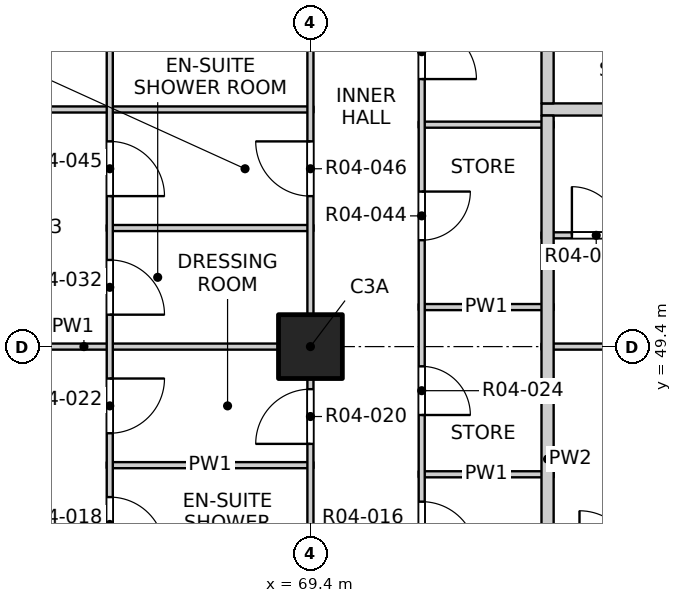
"""IFC4 building model, lengths in metres.
Left out: names, types, materials, properties, quantities, classifications, styles, units other than length and angle.
Written with IfcOpenShell. Run it as: python <this file> out.ifc"""

import sys

from ifc_helpers import new_model, si_unit, direction, frame, frame_2d, origin, origin_2d, place, context, subcontext, project, spatial, rectangle, extrude, element, fill, save


model = new_model("IFC4")
c1 = context("Model", 3, precision=1e-05, world=origin(), true_north=direction((0.0, 1.0)))
c2 = subcontext(c1, "Body", "Model", "MODEL_VIEW")
j1 = project(units=[si_unit("LENGTHUNIT", "METRE"), si_unit("PLANEANGLEUNIT", "RADIAN")], contexts=[c1])
p1 = place(None, origin())
s1 = spatial("IfcSite", under=j1, at=p1, CompositionType="ELEMENT")
p2 = place(p1, origin())
s2 = spatial("IfcBuilding", under=s1, at=p2, CompositionType="ELEMENT")
p3 = place(p2, frame((0.0, 0.0, 58.0)))
s3 = spatial("IfcBuildingStorey", under=s2, at=p3, CompositionType="ELEMENT", Elevation=58.0)
p4 = place(p3, frame((69.4, 49.4, -0.25), z_axis=(0.0, 0.0, 1.0), x_axis=(1.0, 0.0, 0.0)))
e1 = element("IfcColumn", 1, at=p4, inside=s3, PredefinedType="COLUMN", context=c2, shape_type="SweptSolid", body=[
    extrude(rectangle(XDim=1.05, YDim=1.05, at=origin_2d()), origin(), (0.0, 0.0, 1.0), 3.4),
])
p5 = place(p3, frame((71.18, 47.3, 0.0), z_axis=(0.0, 0.0, 1.0), x_axis=(1.0, 0.0, 0.0)))
e2 = element("IfcWall", 2, at=p5, inside=s3, PredefinedType="PARTITIONING", context=c2, shape_type="SweptSolid", body=[
    extrude(rectangle(XDim=2.22, YDim=0.1, at=frame_2d((1.11, 0.0))), origin(), (0.0, 0.0, 1.0), 3.15),
])
p6 = place(p3, frame((66.05, 47.45, 0.0), z_axis=(0.0, 0.0, 1.0), x_axis=(1.0, 0.0, 0.0)))
e3 = element("IfcWall", 3, at=p6, inside=s3, PredefinedType="PARTITIONING", context=c2, shape_type="SweptSolid", body=[
    extrude(rectangle(XDim=3.4, YDim=0.1, at=frame_2d((1.7, 0.0))), origin(), (0.0, 0.0, 1.0), 3.15),
])
p7 = place(p3, frame((61.9, 49.4, 0.0), z_axis=(0.0, 0.0, 1.0), x_axis=(1.0, 0.0, 0.0)))
e4 = element("IfcWall", 4, at=p7, inside=s3, PredefinedType="PARTITIONING", context=c2, shape_type="SweptSolid", body=[
    extrude(rectangle(XDim=7.55, YDim=0.1, at=frame_2d((3.775, 0.0))), origin(), (0.0, 0.0, 1.0), 2.55),
])
p8 = place(p3, frame((73.2, 49.4, 0.0), z_axis=(0.0, 0.0, 1.0), x_axis=(1.0, 0.0, 0.0)))
e5 = element("IfcWall", 5, at=p8, inside=s3, PredefinedType="PARTITIONING", context=c2, shape_type="SweptSolid", body=[
    extrude(rectangle(XDim=23.6, YDim=0.1, at=frame_2d((11.8, 0.0))), origin(), (0.0, 0.0, 1.0), 3.15),
])
p9 = place(p8, frame((2.425, 0.0, 0.0)))
e6 = element("IfcOpeningElement", 6, at=p9, cuts=e5, PredefinedType="OPENING", context=c2, shape_type="SweptSolid", body=[
    extrude(rectangle(XDim=0.9, YDim=2.1, at=frame_2d((0.45, 1.05))), frame((0.0, 0.06, 0.0), z_axis=(0.0, -1.0, 0.0), x_axis=(1.0, 0.0, 0.0)), (0.0, 0.0, 1.0), 0.12),
])
p10 = place(p8, frame((5.5, 0.0, 0.0)))
e7 = element("IfcOpeningElement", 7, at=p10, cuts=e5, PredefinedType="OPENING", context=c2, shape_type="SweptSolid", body=[
    extrude(rectangle(XDim=0.9, YDim=2.1, at=frame_2d((0.45, 1.05))), frame((0.0, 0.06, 0.0), z_axis=(0.0, -1.0, 0.0), x_axis=(1.0, 0.0, 0.0)), (0.0, 0.0, 1.0), 0.12),
])
p11 = place(p8, frame((10.2, 0.0, 0.0)))
e8 = element("IfcOpeningElement", 8, at=p11, cuts=e5, PredefinedType="OPENING", context=c2, shape_type="SweptSolid", body=[
    extrude(rectangle(XDim=0.9, YDim=2.1, at=frame_2d((0.45, 1.05))), frame((0.0, 0.06, 0.0), z_axis=(0.0, -1.0, 0.0), x_axis=(1.0, 0.0, 0.0)), (0.0, 0.0, 1.0), 0.12),
])
p12 = place(p8, frame((14.275, 0.0, 0.0)))
e9 = element("IfcOpeningElement", 9, at=p12, cuts=e5, PredefinedType="OPENING", context=c2, shape_type="SweptSolid", body=[
    extrude(rectangle(XDim=0.9, YDim=2.1, at=frame_2d((0.45, 1.05))), frame((0.0, 0.06, 0.0), z_axis=(0.0, -1.0, 0.0), x_axis=(1.0, 0.0, 0.0)), (0.0, 0.0, 1.0), 0.12),
])
p13 = place(p8, frame((17.2, 0.0, 0.0)))
e10 = element("IfcOpeningElement", 10, at=p13, cuts=e5, PredefinedType="OPENING", context=c2, shape_type="SweptSolid", body=[
    extrude(rectangle(XDim=0.9, YDim=2.1, at=frame_2d((0.45, 1.05))), frame((0.0, 0.06, 0.0), z_axis=(0.0, -1.0, 0.0), x_axis=(1.0, 0.0, 0.0)), (0.0, 0.0, 1.0), 0.12),
])
p14 = place(p8, frame((21.1, 0.0, 0.0)))
e11 = element("IfcOpeningElement", 11, at=p14, cuts=e5, PredefinedType="OPENING", context=c2, shape_type="SweptSolid", body=[
    extrude(rectangle(XDim=0.9, YDim=2.1, at=frame_2d((0.45, 1.05))), frame((0.0, 0.06, 0.0), z_axis=(0.0, -1.0, 0.0), x_axis=(1.0, 0.0, 0.0)), (0.0, 0.0, 1.0), 0.12),
])
p15 = place(p3, frame((71.18, 50.05, 0.0), z_axis=(0.0, 0.0, 1.0), x_axis=(1.0, 0.0, 0.0)))
e12 = element("IfcWall", 12, at=p15, inside=s3, PredefinedType="PARTITIONING", context=c2, shape_type="SweptSolid", body=[
    extrude(rectangle(XDim=2.22, YDim=0.1, at=frame_2d((1.11, 0.0))), origin(), (0.0, 0.0, 1.0), 3.15),
])
p16 = place(p3, frame((73.2, 51.23, 0.0), z_axis=(0.0, 0.0, 1.0), x_axis=(1.0, 0.0, 0.0)))
e13 = element("IfcWall", 13, at=p16, inside=s3, PredefinedType="PARTITIONING", context=c2, shape_type="SweptSolid", body=[
    extrude(rectangle(XDim=1.75, YDim=0.1, at=frame_2d((0.875, 0.0))), origin(), (0.0, 0.0, 1.0), 3.15),
])
p17 = place(p16, frame((0.5, 0.0, 0.0)))
e14 = element("IfcOpeningElement", 14, at=p17, cuts=e13, PredefinedType="OPENING", context=c2, shape_type="SweptSolid", body=[
    extrude(rectangle(XDim=0.8, YDim=2.1, at=frame_2d((0.4, 1.05))), frame((0.0, 0.06, 0.0), z_axis=(0.0, -1.0, 0.0), x_axis=(1.0, 0.0, 0.0)), (0.0, 0.0, 1.0), 0.12),
])
p18 = place(p3, frame((66.05, 51.35, 0.0), z_axis=(0.0, 0.0, 1.0), x_axis=(1.0, 0.0, 0.0)))
e15 = element("IfcWall", 15, at=p18, inside=s3, PredefinedType="PARTITIONING", context=c2, shape_type="SweptSolid", body=[
    extrude(rectangle(XDim=3.4, YDim=0.1, at=frame_2d((1.7, 0.0))), origin(), (0.0, 0.0, 1.0), 3.15),
])
p19 = place(p3, frame((71.18, 53.05, 0.0), z_axis=(0.0, 0.0, 1.0), x_axis=(1.0, 0.0, 0.0)))
e16 = element("IfcWall", 16, at=p19, inside=s3, PredefinedType="PARTITIONING", context=c2, shape_type="SweptSolid", body=[
    extrude(rectangle(XDim=2.22, YDim=0.1, at=frame_2d((1.11, 0.0))), origin(), (0.0, 0.0, 1.0), 3.15),
])
p20 = place(p3, frame((61.9, 53.3, 0.0), z_axis=(0.0, 0.0, 1.0), x_axis=(1.0, 0.0, 0.0)))
e17 = element("IfcWall", 17, at=p20, inside=s3, PredefinedType="PARTITIONING", context=c2, shape_type="SweptSolid", body=[
    extrude(rectangle(XDim=7.55, YDim=0.1, at=frame_2d((3.775, 0.0))), origin(), (0.0, 0.0, 1.0), 3.15),
])
p21 = place(p3, frame((73.2, 53.3, 0.0), z_axis=(0.0, 0.0, 1.0), x_axis=(1.0, 0.0, 0.0)))
e18 = element("IfcWall", 18, at=p21, inside=s3, PredefinedType="PARTITIONING", context=c2, shape_type="SweptSolid", body=[
    extrude(rectangle(XDim=23.6, YDim=0.2, at=frame_2d((11.8, 0.0))), origin(), (0.0, 0.0, 1.0), 3.15),
])
p22 = place(p21, frame((2.975, 0.0, 0.0)))
e19 = element("IfcOpeningElement", 19, at=p22, cuts=e18, PredefinedType="OPENING", context=c2, shape_type="SweptSolid", body=[
    extrude(rectangle(XDim=1.0, YDim=2.1, at=frame_2d((0.5, 1.05))), frame((0.0, 0.11, 0.0), z_axis=(0.0, -1.0, 0.0), x_axis=(1.0, 0.0, 0.0)), (0.0, 0.0, 1.0), 0.22),
])
p23 = place(p21, frame((17.875, 0.0, 0.0)))
e20 = element("IfcOpeningElement", 20, at=p23, cuts=e18, PredefinedType="OPENING", context=c2, shape_type="SweptSolid", body=[
    extrude(rectangle(XDim=1.0, YDim=2.1, at=frame_2d((0.5, 1.05))), frame((0.0, 0.11, 0.0), z_axis=(0.0, -1.0, 0.0), x_axis=(1.0, 0.0, 0.0)), (0.0, 0.0, 1.0), 0.22),
])
p24 = place(p3, frame((66.1, 41.9, 0.0), z_axis=(0.0, 0.0, 1.0), x_axis=(0.0, 1.0, 0.0)))
e21 = element("IfcWall", 21, at=p24, inside=s3, PredefinedType="PARTITIONING", context=c2, shape_type="SweptSolid", body=[
    extrude(rectangle(XDim=19.1, YDim=0.1, at=frame_2d((9.55, 0.0))), origin(), (0.0, 0.0, 1.0), 3.15),
])
p25 = place(p24, frame((1.05, 0.0, 0.0)))
e22 = element("IfcOpeningElement", 22, at=p25, cuts=e21, PredefinedType="OPENING", context=c2, shape_type="SweptSolid", body=[
    extrude(rectangle(XDim=1.2, YDim=2.1, at=frame_2d((0.6, 1.05))), frame((0.0, 0.06, 0.0), z_axis=(0.0, -1.0, 0.0), x_axis=(1.0, 0.0, 0.0)), (0.0, 0.0, 1.0), 0.12),
])
p26 = place(p24, frame((4.125, 0.0, 0.0)))
e23 = element("IfcOpeningElement", 23, at=p26, cuts=e21, PredefinedType="OPENING", context=c2, shape_type="SweptSolid", body=[
    extrude(rectangle(XDim=0.9, YDim=2.1, at=frame_2d((0.45, 1.05))), frame((0.0, 0.06, 0.0), z_axis=(0.0, -1.0, 0.0), x_axis=(1.0, 0.0, 0.0)), (0.0, 0.0, 1.0), 0.12),
])
p27 = place(p24, frame((6.075, 0.0, 0.0)))
e24 = element("IfcOpeningElement", 24, at=p27, cuts=e21, PredefinedType="OPENING", context=c2, shape_type="SweptSolid", body=[
    extrude(rectangle(XDim=0.9, YDim=2.1, at=frame_2d((0.45, 1.05))), frame((0.0, 0.06, 0.0), z_axis=(0.0, -1.0, 0.0), x_axis=(1.0, 0.0, 0.0)), (0.0, 0.0, 1.0), 0.12),
])
p28 = place(p24, frame((8.025, 0.0, 0.0)))
e25 = element("IfcOpeningElement", 25, at=p28, cuts=e21, PredefinedType="OPENING", context=c2, shape_type="SweptSolid", body=[
    extrude(rectangle(XDim=0.9, YDim=2.1, at=frame_2d((0.45, 1.05))), frame((0.0, 0.06, 0.0), z_axis=(0.0, -1.0, 0.0), x_axis=(1.0, 0.0, 0.0)), (0.0, 0.0, 1.0), 0.12),
])
p29 = place(p24, frame((9.975, 0.0, 0.0)))
e26 = element("IfcOpeningElement", 26, at=p29, cuts=e21, PredefinedType="OPENING", context=c2, shape_type="SweptSolid", body=[
    extrude(rectangle(XDim=0.9, YDim=2.1, at=frame_2d((0.45, 1.05))), frame((0.0, 0.06, 0.0), z_axis=(0.0, -1.0, 0.0), x_axis=(1.0, 0.0, 0.0)), (0.0, 0.0, 1.0), 0.12),
])
p30 = place(p24, frame((12.75, 0.0, 0.0)))
e27 = element("IfcOpeningElement", 27, at=p30, cuts=e21, PredefinedType="OPENING", context=c2, shape_type="SweptSolid", body=[
    extrude(rectangle(XDim=1.2, YDim=2.1, at=frame_2d((0.6, 1.05))), frame((0.0, 0.06, 0.0), z_axis=(0.0, -1.0, 0.0), x_axis=(1.0, 0.0, 0.0)), (0.0, 0.0, 1.0), 0.12),
])
p31 = place(p24, frame((15.825, 0.0, 0.0)))
e28 = element("IfcOpeningElement", 28, at=p31, cuts=e21, PredefinedType="OPENING", context=c2, shape_type="SweptSolid", body=[
    extrude(rectangle(XDim=0.9, YDim=2.1, at=frame_2d((0.45, 1.05))), frame((0.0, 0.06, 0.0), z_axis=(0.0, -1.0, 0.0), x_axis=(1.0, 0.0, 0.0)), (0.0, 0.0, 1.0), 0.12),
])
p32 = place(p24, frame((17.775, 0.0, 0.0)))
e29 = element("IfcOpeningElement", 29, at=p32, cuts=e21, PredefinedType="OPENING", context=c2, shape_type="SweptSolid", body=[
    extrude(rectangle(XDim=0.9, YDim=2.1, at=frame_2d((0.45, 1.05))), frame((0.0, 0.06, 0.0), z_axis=(0.0, -1.0, 0.0), x_axis=(1.0, 0.0, 0.0)), (0.0, 0.0, 1.0), 0.12),
])
p33 = place(p3, frame((69.4, 41.9, 0.0), z_axis=(0.0, 0.0, 1.0), x_axis=(0.0, 1.0, 0.0)))
e30 = element("IfcWall", 30, at=p33, inside=s3, PredefinedType="PARTITIONING", context=c2, shape_type="SweptSolid", body=[
    extrude(rectangle(XDim=7.5, YDim=0.1, at=frame_2d((3.75, 0.0))), origin(), (0.0, 0.0, 1.0), 2.55),
])
p34 = place(p33, frame((1.2, 0.0, 0.0)))
e31 = element("IfcOpeningElement", 31, at=p34, cuts=e30, PredefinedType="OPENING", context=c2, shape_type="SweptSolid", body=[
    extrude(rectangle(XDim=0.9, YDim=2.1, at=frame_2d((0.45, 1.05))), frame((0.0, 0.06, 0.0), z_axis=(0.0, -1.0, 0.0), x_axis=(1.0, 0.0, 0.0)), (0.0, 0.0, 1.0), 0.12),
])
p35 = place(p33, frame((5.9, 0.0, 0.0)))
e32 = element("IfcOpeningElement", 32, at=p35, cuts=e30, PredefinedType="OPENING", context=c2, shape_type="SweptSolid", body=[
    extrude(rectangle(XDim=0.9, YDim=2.1, at=frame_2d((0.45, 1.05))), frame((0.0, 0.06, 0.0), z_axis=(0.0, -1.0, 0.0), x_axis=(1.0, 0.0, 0.0)), (0.0, 0.0, 1.0), 0.12),
])
p36 = place(p3, frame((69.4, 49.4, 0.0), z_axis=(0.0, 0.0, 1.0), x_axis=(0.0, 1.0, 0.0)))
e33 = element("IfcWall", 33, at=p36, inside=s3, PredefinedType="PARTITIONING", context=c2, shape_type="SweptSolid", body=[
    extrude(rectangle(XDim=31.2, YDim=0.1, at=frame_2d((15.6, 0.0))), origin(), (0.0, 0.0, 1.0), 3.15),
])
p37 = place(p36, frame((2.475, 0.0, 0.0)))
e34 = element("IfcOpeningElement", 34, at=p37, cuts=e33, PredefinedType="OPENING", context=c2, shape_type="SweptSolid", body=[
    extrude(rectangle(XDim=0.9, YDim=2.1, at=frame_2d((0.45, 1.05))), frame((0.0, 0.06, 0.0), z_axis=(0.0, -1.0, 0.0), x_axis=(1.0, 0.0, 0.0)), (0.0, 0.0, 1.0), 0.12),
])
p38 = place(p36, frame((5.4, 0.0, 0.0)))
e35 = element("IfcOpeningElement", 35, at=p38, cuts=e33, PredefinedType="OPENING", context=c2, shape_type="SweptSolid", body=[
    extrude(rectangle(XDim=0.9, YDim=2.1, at=frame_2d((0.45, 1.05))), frame((0.0, 0.06, 0.0), z_axis=(0.0, -1.0, 0.0), x_axis=(1.0, 0.0, 0.0)), (0.0, 0.0, 1.0), 0.12),
])
p39 = place(p36, frame((10.275, 0.0, 0.0)))
e36 = element("IfcOpeningElement", 36, at=p39, cuts=e33, PredefinedType="OPENING", context=c2, shape_type="SweptSolid", body=[
    extrude(rectangle(XDim=0.9, YDim=2.1, at=frame_2d((0.45, 1.05))), frame((0.0, 0.06, 0.0), z_axis=(0.0, -1.0, 0.0), x_axis=(1.0, 0.0, 0.0)), (0.0, 0.0, 1.0), 0.12),
])
p40 = place(p36, frame((13.2, 0.0, 0.0)))
e37 = element("IfcOpeningElement", 37, at=p40, cuts=e33, PredefinedType="OPENING", context=c2, shape_type="SweptSolid", body=[
    extrude(rectangle(XDim=0.9, YDim=2.1, at=frame_2d((0.45, 1.05))), frame((0.0, 0.06, 0.0), z_axis=(0.0, -1.0, 0.0), x_axis=(1.0, 0.0, 0.0)), (0.0, 0.0, 1.0), 0.12),
])
p41 = place(p36, frame((18.075, 0.0, 0.0)))
e38 = element("IfcOpeningElement", 38, at=p41, cuts=e33, PredefinedType="OPENING", context=c2, shape_type="SweptSolid", body=[
    extrude(rectangle(XDim=0.9, YDim=2.1, at=frame_2d((0.45, 1.05))), frame((0.0, 0.06, 0.0), z_axis=(0.0, -1.0, 0.0), x_axis=(1.0, 0.0, 0.0)), (0.0, 0.0, 1.0), 0.12),
])
p42 = place(p36, frame((21.8, 0.0, 0.0)))
e39 = element("IfcOpeningElement", 39, at=p42, cuts=e33, PredefinedType="OPENING", context=c2, shape_type="SweptSolid", body=[
    extrude(rectangle(XDim=0.9, YDim=2.1, at=frame_2d((0.45, 1.05))), frame((0.0, 0.06, 0.0), z_axis=(0.0, -1.0, 0.0), x_axis=(1.0, 0.0, 0.0)), (0.0, 0.0, 1.0), 0.12),
])
p43 = place(p36, frame((25.875, 0.0, 0.0)))
e40 = element("IfcOpeningElement", 40, at=p43, cuts=e33, PredefinedType="OPENING", context=c2, shape_type="SweptSolid", body=[
    extrude(rectangle(XDim=0.9, YDim=2.1, at=frame_2d((0.45, 1.05))), frame((0.0, 0.06, 0.0), z_axis=(0.0, -1.0, 0.0), x_axis=(1.0, 0.0, 0.0)), (0.0, 0.0, 1.0), 0.12),
])
p44 = place(p36, frame((29.6, 0.0, 0.0)))
e41 = element("IfcOpeningElement", 41, at=p44, cuts=e33, PredefinedType="OPENING", context=c2, shape_type="SweptSolid", body=[
    extrude(rectangle(XDim=0.9, YDim=2.1, at=frame_2d((0.45, 1.05))), frame((0.0, 0.06, 0.0), z_axis=(0.0, -1.0, 0.0), x_axis=(1.0, 0.0, 0.0)), (0.0, 0.0, 1.0), 0.12),
])
p45 = place(p3, frame((71.23, 45.55, 0.0), z_axis=(0.0, 0.0, 1.0), x_axis=(0.0, 1.0, 0.0)))
e42 = element("IfcWall", 42, at=p45, inside=s3, PredefinedType="PARTITIONING", context=c2, shape_type="SweptSolid", body=[
    extrude(rectangle(XDim=9.85, YDim=0.1, at=frame_2d((4.925, 0.0))), origin(), (0.0, 0.0, 1.0), 3.15),
])
p46 = place(p45, frame((0.4, 0.0, 0.0)))
e43 = element("IfcOpeningElement", 43, at=p46, cuts=e42, PredefinedType="OPENING", context=c2, shape_type="SweptSolid", body=[
    extrude(rectangle(XDim=0.9, YDim=2.1, at=frame_2d((0.45, 1.05))), frame((0.0, 0.06, 0.0), z_axis=(0.0, -1.0, 0.0), x_axis=(1.0, 0.0, 0.0)), (0.0, 0.0, 1.0), 0.12),
])
p47 = place(p45, frame((2.725, 0.0, 0.0)))
e44 = element("IfcOpeningElement", 44, at=p47, cuts=e42, PredefinedType="OPENING", context=c2, shape_type="SweptSolid", body=[
    extrude(rectangle(XDim=0.8, YDim=2.1, at=frame_2d((0.4, 1.05))), frame((0.0, 0.06, 0.0), z_axis=(0.0, -1.0, 0.0), x_axis=(1.0, 0.0, 0.0)), (0.0, 0.0, 1.0), 0.12),
])
p48 = place(p45, frame((5.6, 0.0, 0.0)))
e45 = element("IfcOpeningElement", 45, at=p48, cuts=e42, PredefinedType="OPENING", context=c2, shape_type="SweptSolid", body=[
    extrude(rectangle(XDim=0.8, YDim=2.1, at=frame_2d((0.4, 1.05))), frame((0.0, 0.06, 0.0), z_axis=(0.0, -1.0, 0.0), x_axis=(1.0, 0.0, 0.0)), (0.0, 0.0, 1.0), 0.12),
])
p49 = place(p45, frame((8.25, 0.0, 0.0)))
e46 = element("IfcOpeningElement", 46, at=p49, cuts=e42, PredefinedType="OPENING", context=c2, shape_type="SweptSolid", body=[
    extrude(rectangle(XDim=0.9, YDim=2.1, at=frame_2d((0.45, 1.05))), frame((0.0, 0.06, 0.0), z_axis=(0.0, -1.0, 0.0), x_axis=(1.0, 0.0, 0.0)), (0.0, 0.0, 1.0), 0.12),
])
p50 = place(p3, frame((73.3, 41.9, 0.0), z_axis=(0.0, 0.0, 1.0), x_axis=(0.0, 1.0, 0.0)))
e47 = element("IfcWall", 47, at=p50, inside=s3, PredefinedType="PARTITIONING", context=c2, shape_type="SweptSolid", body=[
    extrude(rectangle(XDim=11.3, YDim=0.2, at=frame_2d((5.65, 0.0))), origin(), (0.0, 0.0, 1.0), 3.15),
])
p51 = place(p3, frame((73.3, 53.4, 0.0), z_axis=(0.0, 0.0, 1.0), x_axis=(0.0, 1.0, 0.0)))
e48 = element("IfcWall", 48, at=p51, inside=s3, PredefinedType="PARTITIONING", context=c2, shape_type="SweptSolid", body=[
    extrude(rectangle(XDim=31.0, YDim=0.2, at=frame_2d((15.5, 0.0))), origin(), (0.0, 0.0, 1.0), 3.15),
])
p52 = place(p51, frame((3.325, 0.0, 0.0)))
e49 = element("IfcOpeningElement", 49, at=p52, cuts=e48, PredefinedType="OPENING", context=c2, shape_type="SweptSolid", body=[
    extrude(rectangle(XDim=1.0, YDim=2.1, at=frame_2d((0.5, 1.05))), frame((0.0, 0.11, 0.0), z_axis=(0.0, -1.0, 0.0), x_axis=(1.0, 0.0, 0.0)), (0.0, 0.0, 1.0), 0.22),
])
p53 = place(p51, frame((21.675, 0.0, 0.0)))
e50 = element("IfcOpeningElement", 50, at=p53, cuts=e48, PredefinedType="OPENING", context=c2, shape_type="SweptSolid", body=[
    extrude(rectangle(XDim=1.0, YDim=2.1, at=frame_2d((0.5, 1.05))), frame((0.0, 0.11, 0.0), z_axis=(0.0, -1.0, 0.0), x_axis=(1.0, 0.0, 0.0)), (0.0, 0.0, 1.0), 0.22),
])
p54 = place(p51, frame((26.225, 0.0, 0.0)))
e51 = element("IfcOpeningElement", 51, at=p54, cuts=e48, PredefinedType="OPENING", context=c2, shape_type="SweptSolid", body=[
    extrude(rectangle(XDim=1.0, YDim=2.1, at=frame_2d((0.5, 1.05))), frame((0.0, 0.11, 0.0), z_axis=(0.0, -1.0, 0.0), x_axis=(1.0, 0.0, 0.0)), (0.0, 0.0, 1.0), 0.22),
])
p55 = place(p46, origin())
e52 = element("IfcDoor", 52, at=p55, inside=s3, OperationType="SINGLE_SWING_RIGHT", PredefinedType="DOOR", context=c2, shape_type="SweptSolid", body=[
    extrude(rectangle(XDim=0.9, YDim=2.1, at=frame_2d((0.45, 1.05))), frame((0.0, 0.025, 0.0), z_axis=(0.0, -1.0, 0.0), x_axis=(1.0, 0.0, 0.0)), (0.0, 0.0, 1.0), 0.05),
])
fill(e43, e52)
p56 = place(p26, origin())
e53 = element("IfcDoor", 53, at=p56, inside=s3, OperationType="SINGLE_SWING_RIGHT", PredefinedType="DOOR", context=c2, shape_type="SweptSolid", body=[
    extrude(rectangle(XDim=0.9, YDim=2.1, at=frame_2d((0.45, 1.05))), frame((0.0, 0.025, 0.0), z_axis=(0.0, -1.0, 0.0), x_axis=(1.0, 0.0, 0.0)), (0.0, 0.0, 1.0), 0.05),
])
fill(e23, e53)
p57 = place(p35, origin())
e54 = element("IfcDoor", 54, at=p57, inside=s3, OperationType="SINGLE_SWING_LEFT", PredefinedType="DOOR", context=c2, shape_type="SweptSolid", body=[
    extrude(rectangle(XDim=0.9, YDim=2.1, at=frame_2d((0.45, 1.05))), frame((0.0, 0.025, 0.0), z_axis=(0.0, -1.0, 0.0), x_axis=(1.0, 0.0, 0.0)), (0.0, 0.0, 1.0), 0.05),
])
fill(e32, e54)
p58 = place(p27, origin())
e55 = element("IfcDoor", 55, at=p58, inside=s3, OperationType="SINGLE_SWING_LEFT", PredefinedType="DOOR", context=c2, shape_type="SweptSolid", body=[
    extrude(rectangle(XDim=0.9, YDim=2.1, at=frame_2d((0.45, 1.05))), frame((0.0, 0.025, 0.0), z_axis=(0.0, -1.0, 0.0), x_axis=(1.0, 0.0, 0.0)), (0.0, 0.0, 1.0), 0.05),
])
fill(e24, e55)
p59 = place(p47, origin())
e56 = element("IfcDoor", 56, at=p59, inside=s3, OperationType="SINGLE_SWING_RIGHT", PredefinedType="DOOR", context=c2, shape_type="SweptSolid", body=[
    extrude(rectangle(XDim=0.8, YDim=2.1, at=frame_2d((0.4, 1.05))), frame((0.0, 0.025, 0.0), z_axis=(0.0, -1.0, 0.0), x_axis=(1.0, 0.0, 0.0)), (0.0, 0.0, 1.0), 0.05),
])
fill(e44, e56)
p60 = place(p28, origin())
e57 = element("IfcDoor", 57, at=p60, inside=s3, OperationType="SINGLE_SWING_RIGHT", PredefinedType="DOOR", context=c2, shape_type="SweptSolid", body=[
    extrude(rectangle(XDim=0.9, YDim=2.1, at=frame_2d((0.45, 1.05))), frame((0.0, 0.025, 0.0), z_axis=(0.0, -1.0, 0.0), x_axis=(1.0, 0.0, 0.0)), (0.0, 0.0, 1.0), 0.05),
])
fill(e25, e57)
p61 = place(p17, origin())
e58 = element("IfcDoor", 58, at=p61, inside=s3, OperationType="SINGLE_SWING_LEFT", PredefinedType="DOOR", context=c2, shape_type="SweptSolid", body=[
    extrude(rectangle(XDim=0.8, YDim=2.1, at=frame_2d((0.4, 1.05))), frame((0.0, 0.025, 0.0), z_axis=(0.0, -1.0, 0.0), x_axis=(1.0, 0.0, 0.0)), (0.0, 0.0, 1.0), 0.05),
])
fill(e14, e58)
p62 = place(p48, origin())
e59 = element("IfcDoor", 59, at=p62, inside=s3, OperationType="SINGLE_SWING_LEFT", PredefinedType="DOOR", context=c2, shape_type="SweptSolid", body=[
    extrude(rectangle(XDim=0.8, YDim=2.1, at=frame_2d((0.4, 1.05))), frame((0.0, 0.025, 0.0), z_axis=(0.0, -1.0, 0.0), x_axis=(1.0, 0.0, 0.0)), (0.0, 0.0, 1.0), 0.05),
])
fill(e45, e59)
p63 = place(p29, origin())
e60 = element("IfcDoor", 60, at=p63, inside=s3, OperationType="SINGLE_SWING_RIGHT", PredefinedType="DOOR", context=c2, shape_type="SweptSolid", body=[
    extrude(rectangle(XDim=0.9, YDim=2.1, at=frame_2d((0.45, 1.05))), frame((0.0, 0.025, 0.0), z_axis=(0.0, -1.0, 0.0), x_axis=(1.0, 0.0, 0.0)), (0.0, 0.0, 1.0), 0.05),
])
fill(e26, e60)
p64 = place(p37, origin())
e61 = element("IfcDoor", 61, at=p64, inside=s3, OperationType="SINGLE_SWING_RIGHT", PredefinedType="DOOR", context=c2, shape_type="SweptSolid", body=[
    extrude(rectangle(XDim=0.9, YDim=2.1, at=frame_2d((0.45, 1.05))), frame((0.0, 0.025, 0.0), z_axis=(0.0, -1.0, 0.0), x_axis=(1.0, 0.0, 0.0)), (0.0, 0.0, 1.0), 0.05),
])
fill(e34, e61)
p65 = place(p49, origin())
e62 = element("IfcDoor", 62, at=p65, inside=s3, OperationType="SINGLE_SWING_RIGHT", PredefinedType="DOOR", context=c2, shape_type="SweptSolid", body=[
    extrude(rectangle(XDim=0.9, YDim=2.1, at=frame_2d((0.45, 1.05))), frame((0.0, 0.025, 0.0), z_axis=(0.0, -1.0, 0.0), x_axis=(1.0, 0.0, 0.0)), (0.0, 0.0, 1.0), 0.05),
])
fill(e46, e62)
save(model, sys.argv[1])
